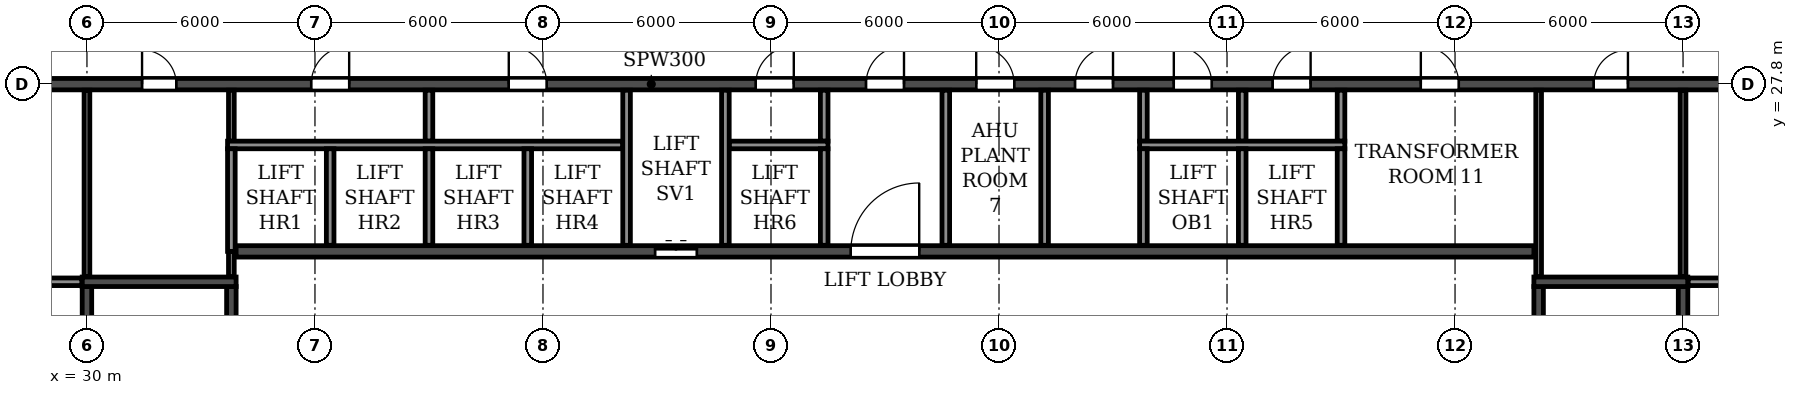
"""IFC4 building model, lengths in metres.
Left out: names, types, materials, properties, quantities, classifications, styles, units other than length and angle.
Written with IfcOpenShell. Run it as: python <this file> out.ifc"""

import sys

from ifc_helpers import new_model, si_unit, direction, frame, frame_2d, origin, place, context, subcontext, project, spatial, rectangle, extrude, element, fill, save


model = new_model("IFC4")
c1 = context("Model", 3, precision=1e-05, world=origin(), true_north=direction((0.0, 1.0)))
c2 = subcontext(c1, "Body", "Model", "MODEL_VIEW")
j1 = project(units=[si_unit("LENGTHUNIT", "METRE"), si_unit("PLANEANGLEUNIT", "RADIAN")], contexts=[c1])
p1 = place(None, origin())
s1 = spatial("IfcSite", under=j1, at=p1, CompositionType="ELEMENT")
p2 = place(p1, origin())
s2 = spatial("IfcBuilding", under=s1, at=p2, CompositionType="ELEMENT")
p3 = place(p2, frame((0.0, 0.0, 267.0)))
s3 = spatial("IfcBuildingStorey", under=s2, at=p3, CompositionType="ELEMENT", Elevation=267.0)
p4 = place(p3, frame((18.2, 27.8, 0.0), z_axis=(0.0, 0.0, 1.0), x_axis=(1.0, 0.0, 0.0)))
e1 = element("IfcWall", 1, at=p4, inside=s3, PredefinedType="SOLIDWALL", context=c2, shape_type="SweptSolid", body=[
    extrude(rectangle(XDim=65.6, YDim=0.3, at=frame_2d((32.8, 0.0))), origin(), (0.0, 0.0, 1.0), 5.15),
])
p5 = place(p4, frame((0.7, 0.0, 0.0)))
e2 = element("IfcOpeningElement", 2, at=p5, cuts=e1, PredefinedType="OPENING", context=c2, shape_type="SweptSolid", body=[
    extrude(rectangle(XDim=1.0, YDim=2.1, at=frame_2d((0.5, 1.05))), frame((0.0, 0.16, 0.0), z_axis=(0.0, -1.0, 0.0), x_axis=(1.0, 0.0, 0.0)), (0.0, 0.0, 1.0), 0.32),
])
p6 = place(p4, frame((4.05, 0.0, 0.0)))
e3 = element("IfcOpeningElement", 3, at=p6, cuts=e1, PredefinedType="OPENING", context=c2, shape_type="SweptSolid", body=[
    extrude(rectangle(XDim=0.9, YDim=2.1, at=frame_2d((0.45, 1.05))), frame((0.0, 0.16, 0.0), z_axis=(0.0, -1.0, 0.0), x_axis=(1.0, 0.0, 0.0)), (0.0, 0.0, 1.0), 0.32),
])
p7 = place(p4, frame((8.6, 0.0, 0.0)))
e4 = element("IfcOpeningElement", 4, at=p7, cuts=e1, PredefinedType="OPENING", context=c2, shape_type="SweptSolid", body=[
    extrude(rectangle(XDim=1.0, YDim=2.1, at=frame_2d((0.5, 1.05))), frame((0.0, 0.16, 0.0), z_axis=(0.0, -1.0, 0.0), x_axis=(1.0, 0.0, 0.0)), (0.0, 0.0, 1.0), 0.32),
])
p8 = place(p4, frame((13.25, 0.0, 0.0)))
e5 = element("IfcOpeningElement", 5, at=p8, cuts=e1, PredefinedType="OPENING", context=c2, shape_type="SweptSolid", body=[
    extrude(rectangle(XDim=0.9, YDim=2.1, at=frame_2d((0.45, 1.05))), frame((0.0, 0.16, 0.0), z_axis=(0.0, -1.0, 0.0), x_axis=(1.0, 0.0, 0.0)), (0.0, 0.0, 1.0), 0.32),
])
p9 = place(p4, frame((17.7, 0.0, 0.0)))
e6 = element("IfcOpeningElement", 6, at=p9, cuts=e1, PredefinedType="OPENING", context=c2, shape_type="SweptSolid", body=[
    extrude(rectangle(XDim=1.0, YDim=2.1, at=frame_2d((0.5, 1.05))), frame((0.0, 0.16, 0.0), z_axis=(0.0, -1.0, 0.0), x_axis=(1.0, 0.0, 0.0)), (0.0, 0.0, 1.0), 0.32),
])
p10 = place(p4, frame((22.9, 0.0, 0.0)))
e7 = element("IfcOpeningElement", 7, at=p10, cuts=e1, PredefinedType="OPENING", context=c2, shape_type="SweptSolid", body=[
    extrude(rectangle(XDim=1.0, YDim=2.1, at=frame_2d((0.5, 1.05))), frame((0.0, 0.16, 0.0), z_axis=(0.0, -1.0, 0.0), x_axis=(1.0, 0.0, 0.0)), (0.0, 0.0, 1.0), 0.32),
])
p11 = place(p4, frame((29.4, 0.0, 0.0)))
e8 = element("IfcOpeningElement", 8, at=p11, cuts=e1, PredefinedType="OPENING", context=c2, shape_type="SweptSolid", body=[
    extrude(rectangle(XDim=1.0, YDim=2.1, at=frame_2d((0.5, 1.05))), frame((0.0, 0.16, 0.0), z_axis=(0.0, -1.0, 0.0), x_axis=(1.0, 0.0, 0.0)), (0.0, 0.0, 1.0), 0.32),
])
p12 = place(p4, frame((32.3, 0.0, 0.0)))
e9 = element("IfcOpeningElement", 9, at=p12, cuts=e1, PredefinedType="OPENING", context=c2, shape_type="SweptSolid", body=[
    extrude(rectangle(XDim=1.0, YDim=2.1, at=frame_2d((0.5, 1.05))), frame((0.0, 0.16, 0.0), z_axis=(0.0, -1.0, 0.0), x_axis=(1.0, 0.0, 0.0)), (0.0, 0.0, 1.0), 0.32),
])
p13 = place(p4, frame((35.2, 0.0, 0.0)))
e10 = element("IfcOpeningElement", 10, at=p13, cuts=e1, PredefinedType="OPENING", context=c2, shape_type="SweptSolid", body=[
    extrude(rectangle(XDim=1.0, YDim=2.1, at=frame_2d((0.5, 1.05))), frame((0.0, 0.16, 0.0), z_axis=(0.0, -1.0, 0.0), x_axis=(1.0, 0.0, 0.0)), (0.0, 0.0, 1.0), 0.32),
])
p14 = place(p4, frame((37.8, 0.0, 0.0)))
e11 = element("IfcOpeningElement", 11, at=p14, cuts=e1, PredefinedType="OPENING", context=c2, shape_type="SweptSolid", body=[
    extrude(rectangle(XDim=1.0, YDim=2.1, at=frame_2d((0.5, 1.05))), frame((0.0, 0.16, 0.0), z_axis=(0.0, -1.0, 0.0), x_axis=(1.0, 0.0, 0.0)), (0.0, 0.0, 1.0), 0.32),
])
p15 = place(p4, frame((40.4, 0.0, 0.0)))
e12 = element("IfcOpeningElement", 12, at=p15, cuts=e1, PredefinedType="OPENING", context=c2, shape_type="SweptSolid", body=[
    extrude(rectangle(XDim=1.0, YDim=2.1, at=frame_2d((0.5, 1.05))), frame((0.0, 0.16, 0.0), z_axis=(0.0, -1.0, 0.0), x_axis=(1.0, 0.0, 0.0)), (0.0, 0.0, 1.0), 0.32),
])
p16 = place(p4, frame((43.0, 0.0, 0.0)))
e13 = element("IfcOpeningElement", 13, at=p16, cuts=e1, PredefinedType="OPENING", context=c2, shape_type="SweptSolid", body=[
    extrude(rectangle(XDim=1.0, YDim=2.1, at=frame_2d((0.5, 1.05))), frame((0.0, 0.16, 0.0), z_axis=(0.0, -1.0, 0.0), x_axis=(1.0, 0.0, 0.0)), (0.0, 0.0, 1.0), 0.32),
])
p17 = place(p4, frame((46.9, 0.0, 0.0)))
e14 = element("IfcOpeningElement", 14, at=p17, cuts=e1, PredefinedType="OPENING", context=c2, shape_type="SweptSolid", body=[
    extrude(rectangle(XDim=1.0, YDim=2.1, at=frame_2d((0.5, 1.05))), frame((0.0, 0.16, 0.0), z_axis=(0.0, -1.0, 0.0), x_axis=(1.0, 0.0, 0.0)), (0.0, 0.0, 1.0), 0.32),
])
p18 = place(p4, frame((51.45, 0.0, 0.0)))
e15 = element("IfcOpeningElement", 15, at=p18, cuts=e1, PredefinedType="OPENING", context=c2, shape_type="SweptSolid", body=[
    extrude(rectangle(XDim=0.9, YDim=2.1, at=frame_2d((0.45, 1.05))), frame((0.0, 0.16, 0.0), z_axis=(0.0, -1.0, 0.0), x_axis=(1.0, 0.0, 0.0)), (0.0, 0.0, 1.0), 0.32),
])
p19 = place(p4, frame((56.0, 0.0, 0.0)))
e16 = element("IfcOpeningElement", 16, at=p19, cuts=e1, PredefinedType="OPENING", context=c2, shape_type="SweptSolid", body=[
    extrude(rectangle(XDim=1.0, YDim=2.1, at=frame_2d((0.5, 1.05))), frame((0.0, 0.16, 0.0), z_axis=(0.0, -1.0, 0.0), x_axis=(1.0, 0.0, 0.0)), (0.0, 0.0, 1.0), 0.32),
])
p20 = place(p4, frame((60.65, 0.0, 0.0)))
e17 = element("IfcOpeningElement", 17, at=p20, cuts=e1, PredefinedType="OPENING", context=c2, shape_type="SweptSolid", body=[
    extrude(rectangle(XDim=0.9, YDim=2.1, at=frame_2d((0.45, 1.05))), frame((0.0, 0.16, 0.0), z_axis=(0.0, -1.0, 0.0), x_axis=(1.0, 0.0, 0.0)), (0.0, 0.0, 1.0), 0.32),
])
p21 = place(p4, frame((63.9, 0.0, 0.0)))
e18 = element("IfcOpeningElement", 18, at=p21, cuts=e1, PredefinedType="OPENING", context=c2, shape_type="SweptSolid", body=[
    extrude(rectangle(XDim=1.0, YDim=2.1, at=frame_2d((0.5, 1.05))), frame((0.0, 0.16, 0.0), z_axis=(0.0, -1.0, 0.0), x_axis=(1.0, 0.0, 0.0)), (0.0, 0.0, 1.0), 0.32),
])
p22 = place(p3, frame((33.925, 23.4, 0.0), z_axis=(0.0, 0.0, 1.0), x_axis=(1.0, 0.0, 0.0)))
e19 = element("IfcWall", 19, at=p22, inside=s3, PredefinedType="SOLIDWALL", context=c2, shape_type="SweptSolid", body=[
    extrude(rectangle(XDim=34.15, YDim=0.3, at=frame_2d((17.075, 0.0))), origin(), (0.0, 0.0, 1.0), 5.15),
])
p23 = place(p22, frame((16.175, 0.0, 0.0)))
e20 = element("IfcOpeningElement", 20, at=p23, cuts=e19, PredefinedType="OPENING", context=c2, shape_type="SweptSolid", body=[
    extrude(rectangle(XDim=1.8, YDim=2.1, at=frame_2d((0.9, 1.05))), frame((0.0, 0.16, 0.0), z_axis=(0.0, -1.0, 0.0), x_axis=(1.0, 0.0, 0.0)), (0.0, 0.0, 1.0), 0.32),
])
p24 = place(p22, frame((11.025, 0.0, 0.0)))
e21 = element("IfcOpeningElement", 21, at=p24, cuts=e19, PredefinedType="OPENING", context=c2, shape_type="SweptSolid", body=[
    extrude(rectangle(XDim=1.1, YDim=2.1, at=frame_2d((0.55, 1.05))), frame((0.0, 0.16, 0.0), z_axis=(0.0, -1.0, 0.0), x_axis=(1.0, 0.0, 0.0)), (0.0, 0.0, 1.0), 0.32),
])
p25 = place(p3, frame((30.0, 14.75, 0.0), z_axis=(0.0, 0.0, 1.0), x_axis=(0.0, 1.0, 0.0)))
e22 = element("IfcWall", 22, at=p25, inside=s3, PredefinedType="SOLIDWALL", context=c2, shape_type="SweptSolid", body=[
    extrude(rectangle(XDim=7.725, YDim=0.25, at=frame_2d((3.863, 0.0))), origin(), (0.0, 0.0, 1.0), 5.15),
])
p26 = place(p3, frame((33.8, 14.75, 0.0), z_axis=(0.0, 0.0, 1.0), x_axis=(0.0, 1.0, 0.0)))
e23 = element("IfcWall", 23, at=p26, inside=s3, PredefinedType="SOLIDWALL", context=c2, shape_type="SweptSolid", body=[
    extrude(rectangle(XDim=7.725, YDim=0.25, at=frame_2d((3.863, 0.0))), origin(), (0.0, 0.0, 1.0), 5.15),
])
p27 = place(p26, frame((0.55, 0.0, 0.0)))
e24 = element("IfcOpeningElement", 24, at=p27, cuts=e23, PredefinedType="OPENING", context=c2, shape_type="SweptSolid", body=[
    extrude(rectangle(XDim=1.0, YDim=2.1, at=frame_2d((0.5, 1.05))), frame((0.0, 0.135, 0.0), z_axis=(0.0, -1.0, 0.0), x_axis=(1.0, 0.0, 0.0)), (0.0, 0.0, 1.0), 0.27),
])
p28 = place(p3, frame((29.875, 22.6, 0.0), z_axis=(0.0, 0.0, 1.0), x_axis=(1.0, 0.0, 0.0)))
e25 = element("IfcWall", 25, at=p28, inside=s3, PredefinedType="SOLIDWALL", context=c2, shape_type="SweptSolid", body=[
    extrude(rectangle(XDim=4.05, YDim=0.25, at=frame_2d((2.025, 0.0))), origin(), (0.0, 0.0, 1.0), 5.15),
])
p29 = place(p3, frame((68.2, 14.75, 0.0), z_axis=(0.0, 0.0, 1.0), x_axis=(0.0, 1.0, 0.0)))
e26 = element("IfcWall", 26, at=p29, inside=s3, PredefinedType="SOLIDWALL", context=c2, shape_type="SweptSolid", body=[
    extrude(rectangle(XDim=7.725, YDim=0.25, at=frame_2d((3.863, 0.0))), origin(), (0.0, 0.0, 1.0), 5.15),
])
p30 = place(p29, frame((0.55, 0.0, 0.0)))
e27 = element("IfcOpeningElement", 27, at=p30, cuts=e26, PredefinedType="OPENING", context=c2, shape_type="SweptSolid", body=[
    extrude(rectangle(XDim=1.0, YDim=2.1, at=frame_2d((0.5, 1.05))), frame((0.0, 0.135, 0.0), z_axis=(0.0, -1.0, 0.0), x_axis=(1.0, 0.0, 0.0)), (0.0, 0.0, 1.0), 0.27),
])
p31 = place(p3, frame((72.0, 14.75, 0.0), z_axis=(0.0, 0.0, 1.0), x_axis=(0.0, 1.0, 0.0)))
e28 = element("IfcWall", 28, at=p31, inside=s3, PredefinedType="SOLIDWALL", context=c2, shape_type="SweptSolid", body=[
    extrude(rectangle(XDim=7.725, YDim=0.25, at=frame_2d((3.863, 0.0))), origin(), (0.0, 0.0, 1.0), 5.15),
])
p32 = place(p3, frame((68.075, 22.6, 0.0), z_axis=(0.0, 0.0, 1.0), x_axis=(1.0, 0.0, 0.0)))
e29 = element("IfcWall", 29, at=p32, inside=s3, PredefinedType="SOLIDWALL", context=c2, shape_type="SweptSolid", body=[
    extrude(rectangle(XDim=4.05, YDim=0.25, at=frame_2d((2.025, 0.0))), origin(), (0.0, 0.0, 1.0), 5.15),
])
for number, where, z_axis, x_axis in (
    (30, (24.735, 22.6, 0.0), (0.0, 0.0, 1.0), (1.0, 0.0, 0.0)),
    (31, (72.135, 22.6, 0.0), (0.0, 0.0, 1.0), (1.0, 0.0, 0.0)),
):
    element("IfcWall", number, at=place(p3, frame(where, z_axis=z_axis, x_axis=x_axis)), inside=s3, PredefinedType="PARTITIONING", context=c2, shape_type="SweptSolid", body=[
        extrude(rectangle(XDim=5.13, YDim=0.2, at=frame_2d((2.565, 0.0))), origin(), (0.0, 0.0, 1.0), 5.15),
    ])
for number, where, z_axis, x_axis in (
    (32, (39.0, 26.3, 0.0), (0.0, 0.0, 1.0), (0.0, 1.0, 0.0)),
    (33, (49.4, 26.3, 0.0), (0.0, 0.0, 1.0), (0.0, 1.0, 0.0)),
):
    element("IfcWall", number, at=place(p3, frame(where, z_axis=z_axis, x_axis=x_axis)), inside=s3, PredefinedType="PARTITIONING", context=c2, shape_type="SweptSolid", body=[
        extrude(rectangle(XDim=1.34, YDim=0.2, at=frame_2d((0.67, 0.0))), origin(), (0.0, 0.0, 1.0), 5.15),
    ])
for number, where, z_axis, x_axis in (
    (34, (52.6, 23.56, 0.0), (0.0, 0.0, 1.0), (0.0, 1.0, 0.0)),
    (35, (55.2, 23.56, 0.0), (0.0, 0.0, 1.0), (0.0, 1.0, 0.0)),
):
    element("IfcWall", number, at=place(p3, frame(where, z_axis=z_axis, x_axis=x_axis)), inside=s3, PredefinedType="PARTITIONING", context=c2, shape_type="SweptSolid", body=[
        extrude(rectangle(XDim=4.08, YDim=0.2, at=frame_2d((2.04, 0.0))), origin(), (0.0, 0.0, 1.0), 5.15),
    ])
for number, where, z_axis, x_axis in (
    (36, (57.8, 26.3, 0.0), (0.0, 0.0, 1.0), (0.0, 1.0, 0.0)),
    (37, (60.4, 26.3, 0.0), (0.0, 0.0, 1.0), (0.0, 1.0, 0.0)),
    (38, (63.0, 26.3, 0.0), (0.0, 0.0, 1.0), (0.0, 1.0, 0.0)),
):
    element("IfcWall", number, at=place(p3, frame(where, z_axis=z_axis, x_axis=x_axis)), inside=s3, PredefinedType="PARTITIONING", context=c2, shape_type="SweptSolid", body=[
        extrude(rectangle(XDim=1.34, YDim=0.2, at=frame_2d((0.67, 0.0))), origin(), (0.0, 0.0, 1.0), 5.15),
    ])
p33 = place(p3, frame((30.0, 22.735, 0.0), z_axis=(0.0, 0.0, 1.0), x_axis=(0.0, 1.0, 0.0)))
e39 = element("IfcWall", 39, at=p33, inside=s3, PredefinedType="PARTITIONING", context=c2, shape_type="SweptSolid", body=[
    extrude(rectangle(XDim=4.905, YDim=0.15, at=frame_2d((2.452, 0.0))), origin(), (0.0, 0.0, 1.0), 5.15),
])
p34 = place(p3, frame((33.8, 22.735, 0.0), z_axis=(0.0, 0.0, 1.0), x_axis=(0.0, 1.0, 0.0)))
e40 = element("IfcWall", 40, at=p34, inside=s3, PredefinedType="PARTITIONING", context=c2, shape_type="SweptSolid", body=[
    extrude(rectangle(XDim=0.665, YDim=0.15, at=frame_2d((0.333, 0.0))), origin(), (0.0, 0.0, 1.0), 5.15),
])
p35 = place(p3, frame((33.8, 26.3, 0.0), z_axis=(0.0, 0.0, 1.0), x_axis=(0.0, 1.0, 0.0)))
e41 = element("IfcWall", 41, at=p35, inside=s3, PredefinedType="PARTITIONING", context=c2, shape_type="SweptSolid", body=[
    extrude(rectangle(XDim=1.34, YDim=0.15, at=frame_2d((0.67, 0.0))), origin(), (0.0, 0.0, 1.0), 5.15),
])
for number, where, z_axis, x_axis in (
    (42, (68.2, 22.735, 0.0), (0.0, 0.0, 1.0), (0.0, 1.0, 0.0)),
    (43, (72.0, 22.735, 0.0), (0.0, 0.0, 1.0), (0.0, 1.0, 0.0)),
):
    element("IfcWall", number, at=place(p3, frame(where, z_axis=z_axis, x_axis=x_axis)), inside=s3, PredefinedType="PARTITIONING", context=c2, shape_type="SweptSolid", body=[
        extrude(rectangle(XDim=4.905, YDim=0.15, at=frame_2d((2.452, 0.0))), origin(), (0.0, 0.0, 1.0), 5.15),
    ])
p36 = place(p3, frame((33.7, 26.2, 0.0), z_axis=(0.0, 0.0, 1.0), x_axis=(1.0, 0.0, 0.0)))
e44 = element("IfcWall", 44, at=p36, inside=s3, PredefinedType="PARTITIONING", context=c2, shape_type="SweptSolid", body=[
    extrude(rectangle(XDim=10.4, YDim=0.2, at=frame_2d((5.2, 0.0))), origin(), (0.0, 0.0, 1.0), 5.15),
])
p37 = place(p3, frame((46.9, 26.2, 0.0), z_axis=(0.0, 0.0, 1.0), x_axis=(1.0, 0.0, 0.0)))
e45 = element("IfcWall", 45, at=p37, inside=s3, PredefinedType="PARTITIONING", context=c2, shape_type="SweptSolid", body=[
    extrude(rectangle(XDim=2.6, YDim=0.2, at=frame_2d((1.3, 0.0))), origin(), (0.0, 0.0, 1.0), 5.15),
])
p38 = place(p3, frame((57.7, 26.2, 0.0), z_axis=(0.0, 0.0, 1.0), x_axis=(1.0, 0.0, 0.0)))
e46 = element("IfcWall", 46, at=p38, inside=s3, PredefinedType="PARTITIONING", context=c2, shape_type="SweptSolid", body=[
    extrude(rectangle(XDim=5.4, YDim=0.2, at=frame_2d((2.7, 0.0))), origin(), (0.0, 0.0, 1.0), 5.15),
])
p39 = place(p3, frame((33.8, 23.4, 0.0), z_axis=(0.0, 0.0, 1.0), x_axis=(0.0, 1.0, 0.0)))
e47 = element("IfcWall", 47, at=p39, inside=s3, PredefinedType="PARTITIONING", context=c2, shape_type="SweptSolid", body=[
    extrude(rectangle(XDim=2.7, YDim=0.2, at=frame_2d((1.35, 0.0))), origin(), (0.0, 0.0, 1.0), 5.15),
])
for number, where, z_axis, x_axis in (
    (48, (36.4, 23.56, 0.0), (0.0, 0.0, 1.0), (0.0, 1.0, 0.0)),
    (49, (39.0, 23.56, 0.0), (0.0, 0.0, 1.0), (0.0, 1.0, 0.0)),
    (50, (41.6, 23.56, 0.0), (0.0, 0.0, 1.0), (0.0, 1.0, 0.0)),
):
    element("IfcWall", number, at=place(p3, frame(where, z_axis=z_axis, x_axis=x_axis)), inside=s3, PredefinedType="PARTITIONING", context=c2, shape_type="SweptSolid", body=[
        extrude(rectangle(XDim=2.54, YDim=0.2, at=frame_2d((1.27, 0.0))), origin(), (0.0, 0.0, 1.0), 5.15),
    ])
for number, where, z_axis, x_axis in (
    (51, (44.2, 23.56, 0.0), (0.0, 0.0, 1.0), (0.0, 1.0, 0.0)),
    (52, (46.8, 23.56, 0.0), (0.0, 0.0, 1.0), (0.0, 1.0, 0.0)),
):
    element("IfcWall", number, at=place(p3, frame(where, z_axis=z_axis, x_axis=x_axis)), inside=s3, PredefinedType="PARTITIONING", context=c2, shape_type="SweptSolid", body=[
        extrude(rectangle(XDim=4.08, YDim=0.2, at=frame_2d((2.04, 0.0))), origin(), (0.0, 0.0, 1.0), 5.15),
    ])
for number, where, z_axis, x_axis in (
    (53, (49.4, 23.56, 0.0), (0.0, 0.0, 1.0), (0.0, 1.0, 0.0)),
    (54, (57.8, 23.56, 0.0), (0.0, 0.0, 1.0), (0.0, 1.0, 0.0)),
    (55, (60.4, 23.56, 0.0), (0.0, 0.0, 1.0), (0.0, 1.0, 0.0)),
    (56, (63.0, 23.56, 0.0), (0.0, 0.0, 1.0), (0.0, 1.0, 0.0)),
):
    element("IfcWall", number, at=place(p3, frame(where, z_axis=z_axis, x_axis=x_axis)), inside=s3, PredefinedType="PARTITIONING", context=c2, shape_type="SweptSolid", body=[
        extrude(rectangle(XDim=2.54, YDim=0.2, at=frame_2d((1.27, 0.0))), origin(), (0.0, 0.0, 1.0), 5.15),
    ])
p40 = place(p8, origin())
e57 = element("IfcDoor", 57, at=p40, inside=s3, OperationType="SINGLE_SWING_LEFT", PredefinedType="DOOR", context=c2, shape_type="SweptSolid", body=[
    extrude(rectangle(XDim=0.9, YDim=2.1, at=frame_2d((0.45, 1.05))), frame((0.0, 0.025, 0.0), z_axis=(0.0, -1.0, 0.0), x_axis=(1.0, 0.0, 0.0)), (0.0, 0.0, 1.0), 0.05),
])
fill(e5, e57)
p41 = place(p9, origin())
e58 = element("IfcDoor", 58, at=p41, inside=s3, OperationType="SINGLE_SWING_RIGHT", PredefinedType="DOOR", context=c2, shape_type="SweptSolid", body=[
    extrude(rectangle(XDim=1.0, YDim=2.1, at=frame_2d((0.5, 1.05))), frame((0.0, 0.025, 0.0), z_axis=(0.0, -1.0, 0.0), x_axis=(1.0, 0.0, 0.0)), (0.0, 0.0, 1.0), 0.05),
])
fill(e6, e58)
p42 = place(p10, origin())
e59 = element("IfcDoor", 59, at=p42, inside=s3, OperationType="SINGLE_SWING_LEFT", PredefinedType="DOOR", context=c2, shape_type="SweptSolid", body=[
    extrude(rectangle(XDim=1.0, YDim=2.1, at=frame_2d((0.5, 1.05))), frame((0.0, 0.025, 0.0), z_axis=(0.0, -1.0, 0.0), x_axis=(1.0, 0.0, 0.0)), (0.0, 0.0, 1.0), 0.05),
])
fill(e7, e59)
p43 = place(p11, origin())
e60 = element("IfcDoor", 60, at=p43, inside=s3, OperationType="SINGLE_SWING_RIGHT", PredefinedType="DOOR", context=c2, shape_type="SweptSolid", body=[
    extrude(rectangle(XDim=1.0, YDim=2.1, at=frame_2d((0.5, 1.05))), frame((0.0, 0.025, 0.0), z_axis=(0.0, -1.0, 0.0), x_axis=(1.0, 0.0, 0.0)), (0.0, 0.0, 1.0), 0.05),
])
fill(e8, e60)
p44 = place(p12, origin())
e61 = element("IfcDoor", 61, at=p44, inside=s3, OperationType="SINGLE_SWING_RIGHT", PredefinedType="DOOR", context=c2, shape_type="SweptSolid", body=[
    extrude(rectangle(XDim=1.0, YDim=2.1, at=frame_2d((0.5, 1.05))), frame((0.0, 0.025, 0.0), z_axis=(0.0, -1.0, 0.0), x_axis=(1.0, 0.0, 0.0)), (0.0, 0.0, 1.0), 0.05),
])
fill(e9, e61)
p45 = place(p13, origin())
e62 = element("IfcDoor", 62, at=p45, inside=s3, OperationType="SINGLE_SWING_LEFT", PredefinedType="DOOR", context=c2, shape_type="SweptSolid", body=[
    extrude(rectangle(XDim=1.0, YDim=2.1, at=frame_2d((0.5, 1.05))), frame((0.0, 0.025, 0.0), z_axis=(0.0, -1.0, 0.0), x_axis=(1.0, 0.0, 0.0)), (0.0, 0.0, 1.0), 0.05),
])
fill(e10, e62)
p46 = place(p14, origin())
e63 = element("IfcDoor", 63, at=p46, inside=s3, OperationType="SINGLE_SWING_RIGHT", PredefinedType="DOOR", context=c2, shape_type="SweptSolid", body=[
    extrude(rectangle(XDim=1.0, YDim=2.1, at=frame_2d((0.5, 1.05))), frame((0.0, 0.025, 0.0), z_axis=(0.0, -1.0, 0.0), x_axis=(1.0, 0.0, 0.0)), (0.0, 0.0, 1.0), 0.05),
])
fill(e11, e63)
p47 = place(p15, origin())
e64 = element("IfcDoor", 64, at=p47, inside=s3, OperationType="SINGLE_SWING_LEFT", PredefinedType="DOOR", context=c2, shape_type="SweptSolid", body=[
    extrude(rectangle(XDim=1.0, YDim=2.1, at=frame_2d((0.5, 1.05))), frame((0.0, 0.025, 0.0), z_axis=(0.0, -1.0, 0.0), x_axis=(1.0, 0.0, 0.0)), (0.0, 0.0, 1.0), 0.05),
])
fill(e12, e64)
p48 = place(p16, origin())
e65 = element("IfcDoor", 65, at=p48, inside=s3, OperationType="SINGLE_SWING_RIGHT", PredefinedType="DOOR", context=c2, shape_type="SweptSolid", body=[
    extrude(rectangle(XDim=1.0, YDim=2.1, at=frame_2d((0.5, 1.05))), frame((0.0, 0.025, 0.0), z_axis=(0.0, -1.0, 0.0), x_axis=(1.0, 0.0, 0.0)), (0.0, 0.0, 1.0), 0.05),
])
fill(e13, e65)
p49 = place(p17, origin())
e66 = element("IfcDoor", 66, at=p49, inside=s3, OperationType="SINGLE_SWING_LEFT", PredefinedType="DOOR", context=c2, shape_type="SweptSolid", body=[
    extrude(rectangle(XDim=1.0, YDim=2.1, at=frame_2d((0.5, 1.05))), frame((0.0, 0.025, 0.0), z_axis=(0.0, -1.0, 0.0), x_axis=(1.0, 0.0, 0.0)), (0.0, 0.0, 1.0), 0.05),
])
fill(e14, e66)
p50 = place(p18, origin())
e67 = element("IfcDoor", 67, at=p50, inside=s3, OperationType="SINGLE_SWING_RIGHT", PredefinedType="DOOR", context=c2, shape_type="SweptSolid", body=[
    extrude(rectangle(XDim=0.9, YDim=2.1, at=frame_2d((0.45, 1.05))), frame((0.0, 0.025, 0.0), z_axis=(0.0, -1.0, 0.0), x_axis=(1.0, 0.0, 0.0)), (0.0, 0.0, 1.0), 0.05),
])
fill(e15, e67)
p51 = place(p23, origin())
e68 = element("IfcDoor", 68, at=p51, inside=s3, OperationType="DOUBLE_DOOR_SINGLE_SWING", PredefinedType="DOOR", context=c2, shape_type="SweptSolid", body=[
    extrude(rectangle(XDim=1.8, YDim=2.1, at=frame_2d((0.9, 1.05))), frame((0.0, 0.025, 0.0), z_axis=(0.0, -1.0, 0.0), x_axis=(1.0, 0.0, 0.0)), (0.0, 0.0, 1.0), 0.05),
])
fill(e20, e68)
p52 = place(p24, origin())
e69 = element("IfcDoor", 69, at=p52, inside=s3, OperationType="DOUBLE_DOOR_SLIDING", PredefinedType="DOOR", context=c2, shape_type="SweptSolid", body=[
    extrude(rectangle(XDim=1.1, YDim=2.1, at=frame_2d((0.55, 1.05))), frame((0.0, 0.025, 0.0), z_axis=(0.0, -1.0, 0.0), x_axis=(1.0, 0.0, 0.0)), (0.0, 0.0, 1.0), 0.05),
])
fill(e21, e69)
save(model, sys.argv[1])
